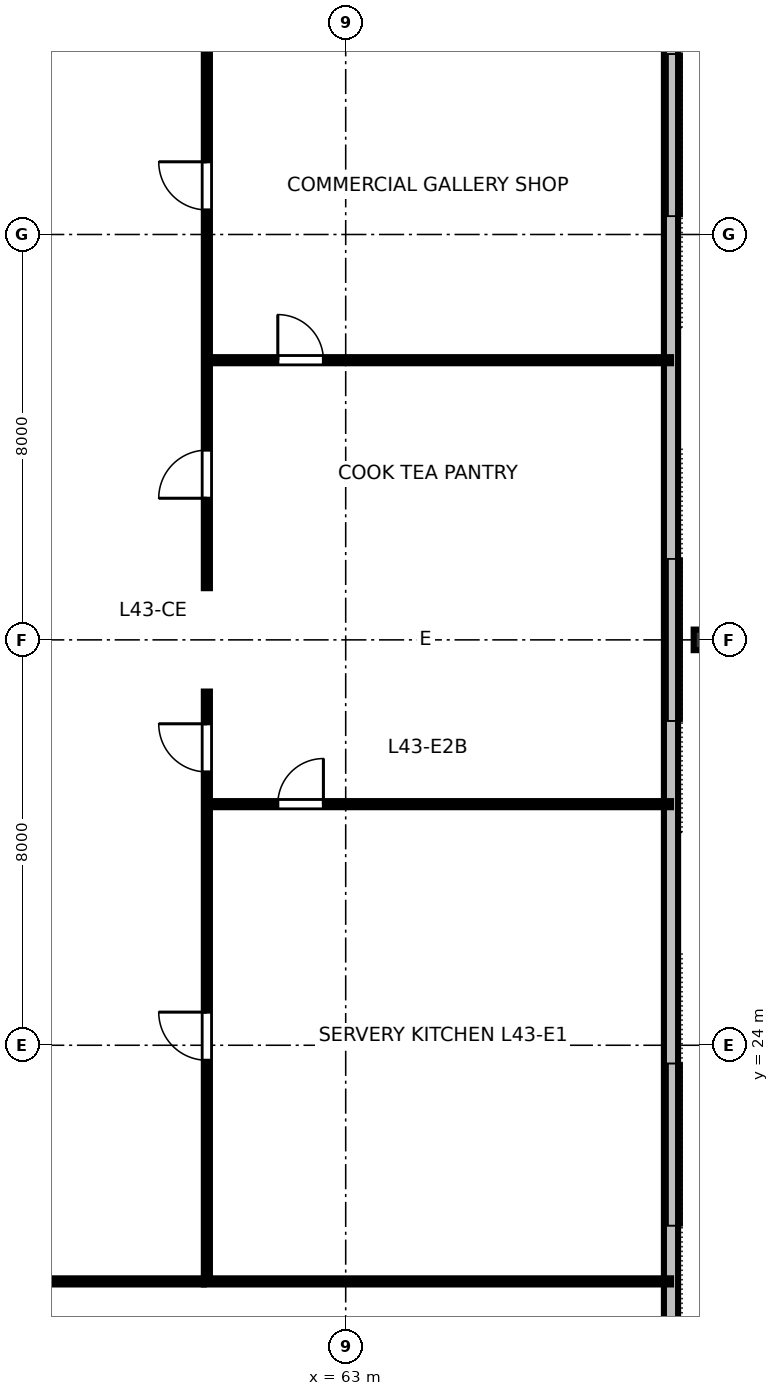
"""IFC4 building model, lengths in metres.
Left out: names, types, materials, properties, quantities, classifications, styles, units other than length and angle.
Written with IfcOpenShell. Run it as: python <this file> out.ifc"""

import sys

from ifc_helpers import new_model, si_unit, direction, frame, frame_2d, origin, origin_2d, place, context, subcontext, project, spatial, rectangle, i_section, extrude, element, fill, save


model = new_model("IFC4")
c1 = context("Model", 3, precision=1e-05, world=origin(), true_north=direction((0.0, 1.0)))
c2 = subcontext(c1, "Body", "Model", "MODEL_VIEW")
j1 = project(units=[si_unit("LENGTHUNIT", "METRE"), si_unit("PLANEANGLEUNIT", "RADIAN")], contexts=[c1])
p1 = place(None, origin())
s1 = spatial("IfcSite", under=j1, at=p1, CompositionType="ELEMENT")
p2 = place(p1, origin())
s2 = spatial("IfcBuilding", under=s1, at=p2, CompositionType="ELEMENT")
p3 = place(p2, frame((0.0, 0.0, 163.6)))
s3 = spatial("IfcBuildingStorey", under=s2, at=p3, CompositionType="ELEMENT", Elevation=163.6)
p4 = place(p3, frame((70.08, 32.0, 0.0), z_axis=(-0.156687816488, 0.0, 0.987648180358), x_axis=(0.987648180358, 0.0, 0.156687816488)))
e1 = element("IfcColumn", 1, at=p4, inside=s3, PredefinedType="COLUMN", context=c2, shape_type="SweptSolid", body=[
    extrude(i_section(OverallWidth=0.406, OverallDepth=0.425, WebThickness=0.033, FlangeThickness=0.052, FilletRadius=0.025, at=origin_2d()), origin(), (0.0, 0.0, 1.0), 3.319),
])
p5 = place(p3, frame((69.42, 16.16, 0.0), z_axis=(0.0, 0.0, 1.0), x_axis=(0.0, 1.0, 0.0)))
e2 = element("IfcWall", 2, at=p5, inside=s3, PredefinedType="STANDARD", context=c2, shape_type="SweptSolid", body=[
    extrude(rectangle(XDim=31.68, YDim=0.28, at=frame_2d((15.84, 0.0))), origin(), (0.0, 0.0, 1.0), 2.151),
])
p6 = place(p3, frame((31.8, 19.34, 0.0), z_axis=(0.0, 0.0, 1.0), x_axis=(1.0, 0.0, 0.0)))
e3 = element("IfcWall", 3, at=p6, inside=s3, PredefinedType="PARTITIONING", context=c2, shape_type="SweptSolid", body=[
    extrude(rectangle(XDim=28.4, YDim=0.12, at=frame_2d((14.2, 0.0))), origin(), (0.0, 0.0, 1.0), 2.56),
])
p7 = place(p6, frame((13.725, 0.0, 0.0)))
e4 = element("IfcOpeningElement", 4, at=p7, cuts=e3, PredefinedType="OPENING", context=c2, shape_type="SweptSolid", body=[
    extrude(rectangle(XDim=0.95, YDim=2.15, at=frame_2d((0.475, 1.075))), frame((0.0, 0.07, 0.0), z_axis=(0.0, -1.0, 0.0), x_axis=(1.0, 0.0, 0.0)), (0.0, 0.0, 1.0), 0.14),
])
p8 = place(p3, frame((60.26, 28.758, 0.0), z_axis=(0.0, 0.0, 1.0), x_axis=(1.0, 0.0, 0.0)))
e5 = element("IfcWall", 5, at=p8, inside=s3, PredefinedType="PARTITIONING", context=c2, shape_type="SweptSolid", body=[
    extrude(rectangle(XDim=9.16, YDim=0.12, at=frame_2d((4.58, 0.0))), origin(), (0.0, 0.0, 1.0), 2.56),
])
p9 = place(p8, frame((1.4, 0.0, 0.0)))
e6 = element("IfcOpeningElement", 6, at=p9, cuts=e5, PredefinedType="OPENING", context=c2, shape_type="SweptSolid", body=[
    extrude(rectangle(XDim=0.9, YDim=2.15, at=frame_2d((0.45, 1.075))), frame((0.0, 0.07, 0.0), z_axis=(0.0, -1.0, 0.0), x_axis=(1.0, 0.0, 0.0)), (0.0, 0.0, 1.0), 0.14),
])
p10 = place(p3, frame((60.26, 37.519, 0.0), z_axis=(0.0, 0.0, 1.0), x_axis=(1.0, 0.0, 0.0)))
e7 = element("IfcWall", 7, at=p10, inside=s3, PredefinedType="PARTITIONING", context=c2, shape_type="SweptSolid", body=[
    extrude(rectangle(XDim=9.16, YDim=0.12, at=frame_2d((4.58, 0.0))), origin(), (0.0, 0.0, 1.0), 2.56),
])
p11 = place(p10, frame((1.4, 0.0, 0.0)))
e8 = element("IfcOpeningElement", 8, at=p11, cuts=e7, PredefinedType="OPENING", context=c2, shape_type="SweptSolid", body=[
    extrude(rectangle(XDim=0.9, YDim=2.15, at=frame_2d((0.45, 1.075))), frame((0.0, 0.07, 0.0), z_axis=(0.0, -1.0, 0.0), x_axis=(1.0, 0.0, 0.0)), (0.0, 0.0, 1.0), 0.14),
])
p12 = place(p3, frame((60.26, 19.4, 0.0), z_axis=(0.0, 0.0, 1.0), x_axis=(0.0, 1.0, 0.0)))
e9 = element("IfcWall", 9, at=p12, inside=s3, PredefinedType="PARTITIONING", context=c2, shape_type="SweptSolid", body=[
    extrude(rectangle(XDim=11.58, YDim=0.12, at=frame_2d((5.79, 0.0))), origin(), (0.0, 0.0, 1.0), 2.56),
])
p13 = place(p12, frame((4.304, 0.0, 0.0)))
e10 = element("IfcOpeningElement", 10, at=p13, cuts=e9, PredefinedType="OPENING", context=c2, shape_type="SweptSolid", body=[
    extrude(rectangle(XDim=0.95, YDim=2.15, at=frame_2d((0.475, 1.075))), frame((0.0, 0.07, 0.0), z_axis=(0.0, -1.0, 0.0), x_axis=(1.0, 0.0, 0.0)), (0.0, 0.0, 1.0), 0.14),
])
p14 = place(p12, frame((9.994, 0.0, 0.0)))
e11 = element("IfcOpeningElement", 11, at=p14, cuts=e9, PredefinedType="OPENING", context=c2, shape_type="SweptSolid", body=[
    extrude(rectangle(XDim=0.95, YDim=2.15, at=frame_2d((0.475, 1.075))), frame((0.0, 0.07, 0.0), z_axis=(0.0, -1.0, 0.0), x_axis=(1.0, 0.0, 0.0)), (0.0, 0.0, 1.0), 0.14),
])
p15 = place(p3, frame((60.26, 33.02, 0.0), z_axis=(0.0, 0.0, 1.0), x_axis=(0.0, 1.0, 0.0)))
e12 = element("IfcWall", 12, at=p15, inside=s3, PredefinedType="PARTITIONING", context=c2, shape_type="SweptSolid", body=[
    extrude(rectangle(XDim=11.58, YDim=0.12, at=frame_2d((5.79, 0.0))), origin(), (0.0, 0.0, 1.0), 2.56),
])
p16 = place(p15, frame((1.775, 0.0, 0.0)))
e13 = element("IfcOpeningElement", 13, at=p16, cuts=e12, PredefinedType="OPENING", context=c2, shape_type="SweptSolid", body=[
    extrude(rectangle(XDim=0.95, YDim=2.15, at=frame_2d((0.475, 1.075))), frame((0.0, 0.07, 0.0), z_axis=(0.0, -1.0, 0.0), x_axis=(1.0, 0.0, 0.0)), (0.0, 0.0, 1.0), 0.14),
])
p17 = place(p15, frame((7.465, 0.0, 0.0)))
e14 = element("IfcOpeningElement", 14, at=p17, cuts=e12, PredefinedType="OPENING", context=c2, shape_type="SweptSolid", body=[
    extrude(rectangle(XDim=0.95, YDim=2.15, at=frame_2d((0.475, 1.075))), frame((0.0, 0.07, 0.0), z_axis=(0.0, -1.0, 0.0), x_axis=(1.0, 0.0, 0.0)), (0.0, 0.0, 1.0), 0.14),
])
p18 = place(p3, frame((60.2, 19.34, 0.0), z_axis=(0.0, 0.0, 1.0), x_axis=(1.0, 0.0, 0.0)))
e15 = element("IfcWall", 15, at=p18, inside=s3, PredefinedType="PARTITIONING", context=c2, shape_type="SweptSolid", body=[
    extrude(rectangle(XDim=9.22, YDim=0.12, at=frame_2d((4.61, 0.0))), origin(), (0.0, 0.0, 1.0), 2.56),
])
p19 = place(p9, origin())
e16 = element("IfcDoor", 16, at=p19, inside=s3, OperationType="SINGLE_SWING_RIGHT", PredefinedType="DOOR", context=c2, shape_type="SweptSolid", body=[
    extrude(rectangle(XDim=0.9, YDim=2.15, at=frame_2d((0.45, 1.075))), frame((0.0, 0.025, 0.0), z_axis=(0.0, -1.0, 0.0), x_axis=(1.0, 0.0, 0.0)), (0.0, 0.0, 1.0), 0.05),
])
fill(e6, e16)
p20 = place(p11, origin())
e17 = element("IfcDoor", 17, at=p20, inside=s3, OperationType="SINGLE_SWING_LEFT", PredefinedType="DOOR", context=c2, shape_type="SweptSolid", body=[
    extrude(rectangle(XDim=0.9, YDim=2.15, at=frame_2d((0.45, 1.075))), frame((0.0, 0.025, 0.0), z_axis=(0.0, -1.0, 0.0), x_axis=(1.0, 0.0, 0.0)), (0.0, 0.0, 1.0), 0.05),
])
fill(e8, e17)
p21 = place(p13, origin())
e18 = element("IfcDoor", 18, at=p21, inside=s3, OperationType="SINGLE_SWING_RIGHT", PredefinedType="DOOR", context=c2, shape_type="SweptSolid", body=[
    extrude(rectangle(XDim=0.95, YDim=2.15, at=frame_2d((0.475, 1.075))), frame((0.0, 0.025, 0.0), z_axis=(0.0, -1.0, 0.0), x_axis=(1.0, 0.0, 0.0)), (0.0, 0.0, 1.0), 0.05),
])
fill(e10, e18)
p22 = place(p14, origin())
e19 = element("IfcDoor", 19, at=p22, inside=s3, OperationType="SINGLE_SWING_RIGHT", PredefinedType="DOOR", context=c2, shape_type="SweptSolid", body=[
    extrude(rectangle(XDim=0.95, YDim=2.15, at=frame_2d((0.475, 1.075))), frame((0.0, 0.025, 0.0), z_axis=(0.0, -1.0, 0.0), x_axis=(1.0, 0.0, 0.0)), (0.0, 0.0, 1.0), 0.05),
])
fill(e11, e19)
p23 = place(p16, origin())
e20 = element("IfcDoor", 20, at=p23, inside=s3, OperationType="SINGLE_SWING_LEFT", PredefinedType="DOOR", context=c2, shape_type="SweptSolid", body=[
    extrude(rectangle(XDim=0.95, YDim=2.15, at=frame_2d((0.475, 1.075))), frame((0.0, 0.025, 0.0), z_axis=(0.0, -1.0, 0.0), x_axis=(1.0, 0.0, 0.0)), (0.0, 0.0, 1.0), 0.05),
])
fill(e13, e20)
p24 = place(p17, origin())
e21 = element("IfcDoor", 21, at=p24, inside=s3, OperationType="SINGLE_SWING_RIGHT", PredefinedType="DOOR", context=c2, shape_type="SweptSolid", body=[
    extrude(rectangle(XDim=0.95, YDim=2.15, at=frame_2d((0.475, 1.075))), frame((0.0, 0.025, 0.0), z_axis=(0.0, -1.0, 0.0), x_axis=(1.0, 0.0, 0.0)), (0.0, 0.0, 1.0), 0.05),
])
fill(e14, e21)
save(model, sys.argv[1])
